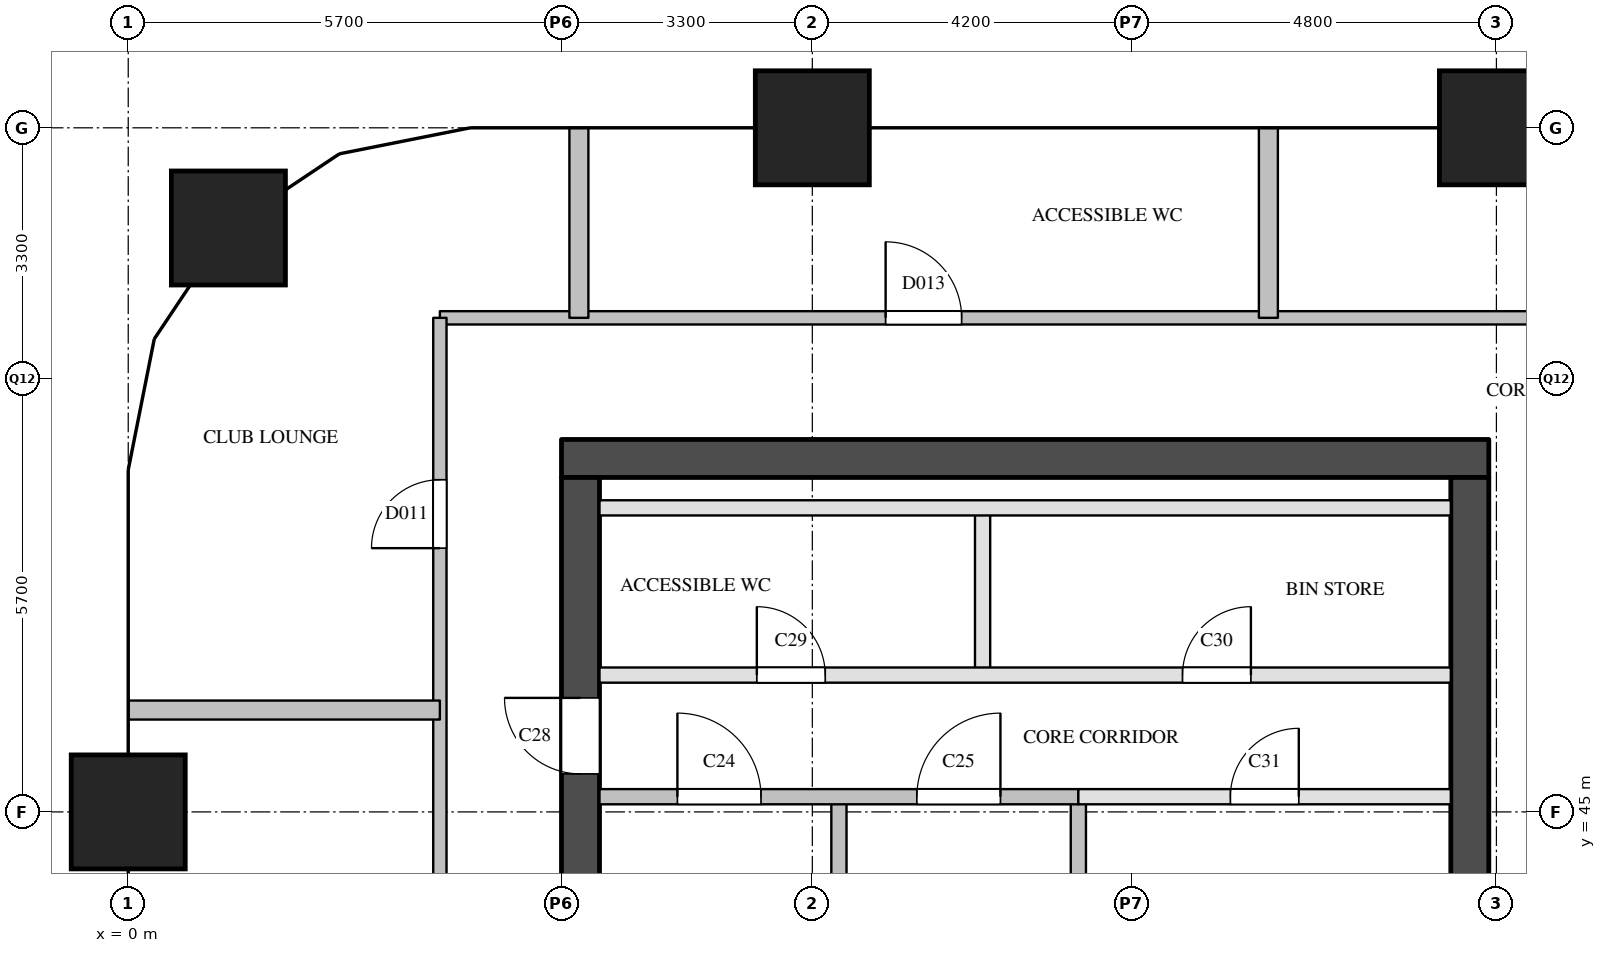
"""IFC4 building model, lengths in metres.
Left out: names, types, materials, properties, quantities, classifications, styles, units other than length and angle.
Written with IfcOpenShell. Run it as: python <this file> out.ifc"""

import sys

from ifc_helpers import new_model, si_unit, direction, frame, frame_2d, origin, origin_2d, place, context, subcontext, project, spatial, rectangle, extrude, element, fill, save


model = new_model("IFC4")
c1 = context("Model", 3, precision=1e-05, world=origin(), true_north=direction((0.0, 1.0)))
c2 = subcontext(c1, "Body", "Model", "MODEL_VIEW")
j1 = project(units=[si_unit("LENGTHUNIT", "METRE"), si_unit("PLANEANGLEUNIT", "RADIAN")], contexts=[c1])
p1 = place(None, origin())
s1 = spatial("IfcSite", under=j1, at=p1, CompositionType="ELEMENT")
p2 = place(p1, origin())
s2 = spatial("IfcBuilding", under=s1, at=p2, CompositionType="ELEMENT")
p3 = place(p2, frame((0.0, 0.0, 177.8)))
s3 = spatial("IfcBuildingStorey", under=s2, at=p3, CompositionType="ELEMENT", Elevation=177.8)
for number, where, z_axis, x_axis in (
    (1, (0.0, 45.0, 0.0), (0.0, 0.0, 1.0), (1.0, 0.0, 0.0)),
    (2, (1.318, 52.682, 0.0), (0.0, 0.0, 1.0), (1.0, 0.0, 0.0)),
    (3, (9.0, 54.0, 0.0), (0.0, 0.0, 1.0), (1.0, 0.0, 0.0)),
    (4, (18.0, 54.0, 0.0), (0.0, 0.0, 1.0), (1.0, 0.0, 0.0)),
):
    element("IfcColumn", number, at=place(p3, frame(where, z_axis=z_axis, x_axis=x_axis)), inside=s3, PredefinedType="COLUMN", context=c2, shape_type="SweptSolid", body=[
        extrude(rectangle(XDim=1.5, YDim=1.5, at=origin_2d()), origin(), (0.0, 0.0, 1.0), 3.9),
    ])
p4 = place(p3, frame((5.7, 49.65, 0.0), z_axis=(0.0, 0.0, 1.0), x_axis=(1.0, 0.0, 0.0)))
e5 = element("IfcWall", 5, at=p4, inside=s3, PredefinedType="SHEAR", context=c2, shape_type="SweptSolid", body=[
    extrude(rectangle(XDim=12.2, YDim=0.5, at=frame_2d((6.1, 0.0))), origin(), (0.0, 0.0, 1.0), 3.6),
])
p5 = place(p3, frame((5.95, 29.1, 0.0), z_axis=(0.0, 0.0, 1.0), x_axis=(0.0, 1.0, 0.0)))
e6 = element("IfcWall", 6, at=p5, inside=s3, PredefinedType="SHEAR", context=c2, shape_type="SweptSolid", body=[
    extrude(rectangle(XDim=20.3, YDim=0.5, at=frame_2d((10.15, 0.0))), origin(), (0.0, 0.0, 1.0), 3.6),
])
p6 = place(p5, frame((3.45, 0.0, 0.0)))
e7 = element("IfcOpeningElement", 7, at=p6, cuts=e6, PredefinedType="OPENING", context=c2, shape_type="SweptSolid", body=[
    extrude(rectangle(XDim=1.0, YDim=2.1, at=frame_2d((0.5, 1.05))), frame((0.0, 0.26, 0.0), z_axis=(0.0, -1.0, 0.0), x_axis=(1.0, 0.0, 0.0)), (0.0, 0.0, 1.0), 0.52),
])
p7 = place(p5, frame((16.4, 0.0, 0.0)))
e8 = element("IfcOpeningElement", 8, at=p7, cuts=e6, PredefinedType="OPENING", context=c2, shape_type="SweptSolid", body=[
    extrude(rectangle(XDim=1.0, YDim=2.1, at=frame_2d((0.5, 1.05))), frame((0.0, 0.26, 0.0), z_axis=(0.0, -1.0, 0.0), x_axis=(1.0, 0.0, 0.0)), (0.0, 0.0, 1.0), 0.52),
])
p8 = place(p3, frame((17.65, 29.1, 0.0), z_axis=(0.0, 0.0, 1.0), x_axis=(0.0, 1.0, 0.0)))
e9 = element("IfcWall", 9, at=p8, inside=s3, PredefinedType="SHEAR", context=c2, shape_type="SweptSolid", body=[
    extrude(rectangle(XDim=20.3, YDim=0.5, at=frame_2d((10.15, 0.0))), origin(), (0.0, 0.0, 1.0), 3.6),
])
p9 = place(p8, frame((1.25, 0.0, 0.0)))
e10 = element("IfcOpeningElement", 10, at=p9, cuts=e9, PredefinedType="OPENING", context=c2, shape_type="SweptSolid", body=[
    extrude(rectangle(XDim=0.7, YDim=2.1, at=frame_2d((0.35, 1.05))), frame((0.0, 0.26, 0.0), z_axis=(0.0, -1.0, 0.0), x_axis=(1.0, 0.0, 0.0)), (0.0, 0.0, 1.0), 0.52),
])
p10 = place(p8, frame((7.05, 0.0, 0.0)))
e11 = element("IfcOpeningElement", 11, at=p10, cuts=e9, PredefinedType="OPENING", context=c2, shape_type="SweptSolid", body=[
    extrude(rectangle(XDim=0.7, YDim=2.1, at=frame_2d((0.35, 1.05))), frame((0.0, 0.26, 0.0), z_axis=(0.0, -1.0, 0.0), x_axis=(1.0, 0.0, 0.0)), (0.0, 0.0, 1.0), 0.52),
])
p11 = place(p8, frame((3.6, 0.0, 0.0)))
e12 = element("IfcOpeningElement", 12, at=p11, cuts=e9, PredefinedType="OPENING", context=c2, shape_type="SweptSolid", body=[
    extrude(rectangle(XDim=1.8, YDim=2.1, at=frame_2d((0.9, 1.05))), frame((0.0, 0.26, 0.0), z_axis=(0.0, -1.0, 0.0), x_axis=(1.0, 0.0, 0.0)), (0.0, 0.0, 1.0), 0.52),
])
p12 = place(p3, frame((9.35, 40.9, 0.0), z_axis=(0.0, 0.0, 1.0), x_axis=(0.0, 1.0, 0.0)))
e13 = element("IfcWall", 13, at=p12, inside=s3, PredefinedType="SOLIDWALL", context=c2, shape_type="SweptSolid", body=[
    extrude(rectangle(XDim=4.3, YDim=0.2, at=frame_2d((2.15, 0.0))), origin(), (0.0, 0.0, 1.0), 3.6),
])
p13 = place(p3, frame((11.24, 46.8, 0.0), z_axis=(0.0, 0.0, 1.0), x_axis=(0.0, 1.0, 0.0)))
e14 = element("IfcWall", 14, at=p13, inside=s3, PredefinedType="PARTITIONING", context=c2, shape_type="SweptSolid", body=[
    extrude(rectangle(XDim=2.2, YDim=0.2, at=frame_2d((1.1, 0.0))), origin(), (0.0, 0.0, 1.0), 3.6),
])
p14 = place(p3, frame((12.5, 40.9, 0.0), z_axis=(0.0, 0.0, 1.0), x_axis=(0.0, 1.0, 0.0)))
e15 = element("IfcWall", 15, at=p14, inside=s3, PredefinedType="SOLIDWALL", context=c2, shape_type="SweptSolid", body=[
    extrude(rectangle(XDim=4.3, YDim=0.2, at=frame_2d((2.15, 0.0))), origin(), (0.0, 0.0, 1.0), 3.6),
])
p15 = place(p3, frame((12.5, 45.2, 0.0), z_axis=(0.0, 0.0, 1.0), x_axis=(1.0, 0.0, 0.0)))
e16 = element("IfcWall", 16, at=p15, inside=s3, PredefinedType="PARTITIONING", context=c2, shape_type="SweptSolid", body=[
    extrude(rectangle(XDim=4.9, YDim=0.2, at=frame_2d((2.45, 0.0))), origin(), (0.0, 0.0, 1.0), 3.6),
])
p16 = place(p15, frame((2.0, 0.0, 0.0)))
e17 = element("IfcOpeningElement", 17, at=p16, cuts=e16, PredefinedType="OPENING", context=c2, shape_type="SweptSolid", body=[
    extrude(rectangle(XDim=0.9, YDim=2.1, at=frame_2d((0.45, 1.05))), frame((0.0, 0.11, 0.0), z_axis=(0.0, -1.0, 0.0), x_axis=(1.0, 0.0, 0.0)), (0.0, 0.0, 1.0), 0.22),
])
p17 = place(p3, frame((6.2, 45.2, 0.0), z_axis=(0.0, 0.0, 1.0), x_axis=(1.0, 0.0, 0.0)))
e18 = element("IfcWall", 18, at=p17, inside=s3, PredefinedType="SOLIDWALL", context=c2, shape_type="SweptSolid", body=[
    extrude(rectangle(XDim=6.3, YDim=0.2, at=frame_2d((3.15, 0.0))), origin(), (0.0, 0.0, 1.0), 3.6),
])
p18 = place(p17, frame((1.025, 0.0, 0.0)))
e19 = element("IfcOpeningElement", 19, at=p18, cuts=e18, PredefinedType="OPENING", context=c2, shape_type="SweptSolid", body=[
    extrude(rectangle(XDim=1.1, YDim=2.1, at=frame_2d((0.55, 1.05))), frame((0.0, 0.11, 0.0), z_axis=(0.0, -1.0, 0.0), x_axis=(1.0, 0.0, 0.0)), (0.0, 0.0, 1.0), 0.22),
])
p19 = place(p17, frame((4.175, 0.0, 0.0)))
e20 = element("IfcOpeningElement", 20, at=p19, cuts=e18, PredefinedType="OPENING", context=c2, shape_type="SweptSolid", body=[
    extrude(rectangle(XDim=1.1, YDim=2.1, at=frame_2d((0.55, 1.05))), frame((0.0, 0.11, 0.0), z_axis=(0.0, -1.0, 0.0), x_axis=(1.0, 0.0, 0.0)), (0.0, 0.0, 1.0), 0.22),
])
p20 = place(p3, frame((6.2, 46.8, 0.0), z_axis=(0.0, 0.0, 1.0), x_axis=(1.0, 0.0, 0.0)))
e21 = element("IfcWall", 21, at=p20, inside=s3, PredefinedType="PARTITIONING", context=c2, shape_type="SweptSolid", body=[
    extrude(rectangle(XDim=11.2, YDim=0.2, at=frame_2d((5.6, 0.0))), origin(), (0.0, 0.0, 1.0), 3.6),
])
p21 = place(p20, frame((2.07, 0.0, 0.0)))
e22 = element("IfcOpeningElement", 22, at=p21, cuts=e21, PredefinedType="OPENING", context=c2, shape_type="SweptSolid", body=[
    extrude(rectangle(XDim=0.9, YDim=2.1, at=frame_2d((0.45, 1.05))), frame((0.0, 0.11, 0.0), z_axis=(0.0, -1.0, 0.0), x_axis=(1.0, 0.0, 0.0)), (0.0, 0.0, 1.0), 0.22),
])
p22 = place(p20, frame((7.67, 0.0, 0.0)))
e23 = element("IfcOpeningElement", 23, at=p22, cuts=e21, PredefinedType="OPENING", context=c2, shape_type="SweptSolid", body=[
    extrude(rectangle(XDim=0.9, YDim=2.1, at=frame_2d((0.45, 1.05))), frame((0.0, 0.11, 0.0), z_axis=(0.0, -1.0, 0.0), x_axis=(1.0, 0.0, 0.0)), (0.0, 0.0, 1.0), 0.22),
])
p23 = place(p3, frame((6.2, 49.0, 0.0), z_axis=(0.0, 0.0, 1.0), x_axis=(1.0, 0.0, 0.0)))
e24 = element("IfcWall", 24, at=p23, inside=s3, PredefinedType="PARTITIONING", context=c2, shape_type="SweptSolid", body=[
    extrude(rectangle(XDim=11.2, YDim=0.2, at=frame_2d((5.6, 0.0))), origin(), (0.0, 0.0, 1.0), 3.6),
])
p24 = place(p3, frame((4.1, 51.5, 0.0), z_axis=(0.0, 0.0, 1.0), x_axis=(1.0, 0.0, 0.0)))
e25 = element("IfcWall", 25, at=p24, inside=s3, PredefinedType="PARTITIONING", context=c2, shape_type="SweptSolid", body=[
    extrude(rectangle(XDim=15.4, YDim=0.175, at=frame_2d((7.7, 0.0))), origin(), (0.0, 0.0, 1.0), 3.6),
])
p25 = place(p24, frame((5.864, 0.0, 0.0)))
e26 = element("IfcOpeningElement", 26, at=p25, cuts=e25, PredefinedType="OPENING", context=c2, shape_type="SweptSolid", body=[
    extrude(rectangle(XDim=1.0, YDim=2.1, at=frame_2d((0.5, 1.05))), frame((0.0, 0.097, 0.0), z_axis=(0.0, -1.0, 0.0), x_axis=(1.0, 0.0, 0.0)), (0.0, 0.0, 1.0), 0.195),
])
p26 = place(p3, frame((4.1, 28.5, 0.0), z_axis=(0.0, 0.0, 1.0), x_axis=(0.0, 1.0, 0.0)))
e27 = element("IfcWall", 27, at=p26, inside=s3, PredefinedType="PARTITIONING", context=c2, shape_type="SweptSolid", body=[
    extrude(rectangle(XDim=23.0, YDim=0.175, at=frame_2d((11.5, 0.0))), origin(), (0.0, 0.0, 1.0), 3.6),
])
p27 = place(p26, frame((2.8, 0.0, 0.0)))
e28 = element("IfcOpeningElement", 28, at=p27, cuts=e27, PredefinedType="OPENING", context=c2, shape_type="SweptSolid", body=[
    extrude(rectangle(XDim=0.9, YDim=2.1, at=frame_2d((0.45, 1.05))), frame((0.0, 0.097, 0.0), z_axis=(0.0, -1.0, 0.0), x_axis=(1.0, 0.0, 0.0)), (0.0, 0.0, 1.0), 0.195),
])
p28 = place(p26, frame((11.72, 0.0, 0.0)))
e29 = element("IfcOpeningElement", 29, at=p28, cuts=e27, PredefinedType="OPENING", context=c2, shape_type="SweptSolid", body=[
    extrude(rectangle(XDim=0.9, YDim=2.1, at=frame_2d((0.45, 1.05))), frame((0.0, 0.097, 0.0), z_axis=(0.0, -1.0, 0.0), x_axis=(1.0, 0.0, 0.0)), (0.0, 0.0, 1.0), 0.195),
])
p29 = place(p26, frame((19.97, 0.0, 0.0)))
e30 = element("IfcOpeningElement", 30, at=p29, cuts=e27, PredefinedType="OPENING", context=c2, shape_type="SweptSolid", body=[
    extrude(rectangle(XDim=0.9, YDim=2.1, at=frame_2d((0.45, 1.05))), frame((0.0, 0.097, 0.0), z_axis=(0.0, -1.0, 0.0), x_axis=(1.0, 0.0, 0.0)), (0.0, 0.0, 1.0), 0.195),
])
p30 = place(p3, frame((0.0, 46.34, 0.0), z_axis=(0.0, 0.0, 1.0), x_axis=(1.0, 0.0, 0.0)))
e31 = element("IfcWall", 31, at=p30, inside=s3, PredefinedType="PARTITIONING", context=c2, shape_type="SweptSolid", body=[
    extrude(rectangle(XDim=4.1, YDim=0.25, at=frame_2d((2.05, 0.0))), origin(), (0.0, 0.0, 1.0), 2.6),
])
for number, where, z_axis, x_axis in (
    (32, (5.929, 51.5, 0.0), (0.0, 0.0, 1.0), (0.0, 1.0, 0.0)),
    (33, (15.0, 51.5, 0.0), (0.0, 0.0, 1.0), (0.0, 1.0, 0.0)),
):
    element("IfcWall", number, at=place(p3, frame(where, z_axis=z_axis, x_axis=x_axis)), inside=s3, PredefinedType="PARTITIONING", context=c2, shape_type="SweptSolid", body=[
        extrude(rectangle(XDim=2.5, YDim=0.25, at=frame_2d((1.25, 0.0))), origin(), (0.0, 0.0, 1.0), 2.6),
    ])
p31 = place(p18, origin())
e34 = element("IfcDoor", 34, at=p31, inside=s3, OperationType="SINGLE_SWING_LEFT", PredefinedType="DOOR", context=c2, shape_type="SweptSolid", body=[
    extrude(rectangle(XDim=1.1, YDim=2.1, at=frame_2d((0.55, 1.05))), frame((0.0, 0.025, 0.0), z_axis=(0.0, -1.0, 0.0), x_axis=(1.0, 0.0, 0.0)), (0.0, 0.0, 1.0), 0.05),
])
fill(e19, e34)
p32 = place(p19, origin())
e35 = element("IfcDoor", 35, at=p32, inside=s3, OperationType="SINGLE_SWING_RIGHT", PredefinedType="DOOR", context=c2, shape_type="SweptSolid", body=[
    extrude(rectangle(XDim=1.1, YDim=2.1, at=frame_2d((0.55, 1.05))), frame((0.0, 0.025, 0.0), z_axis=(0.0, -1.0, 0.0), x_axis=(1.0, 0.0, 0.0)), (0.0, 0.0, 1.0), 0.05),
])
fill(e20, e35)
p33 = place(p7, origin())
e36 = element("IfcDoor", 36, at=p33, inside=s3, OperationType="SINGLE_SWING_RIGHT", PredefinedType="DOOR", context=c2, shape_type="SweptSolid", body=[
    extrude(rectangle(XDim=1.0, YDim=2.1, at=frame_2d((0.5, 1.05))), frame((0.0, 0.025, 0.0), z_axis=(0.0, -1.0, 0.0), x_axis=(1.0, 0.0, 0.0)), (0.0, 0.0, 1.0), 0.05),
])
fill(e8, e36)
p34 = place(p21, origin())
e37 = element("IfcDoor", 37, at=p34, inside=s3, OperationType="SINGLE_SWING_LEFT", PredefinedType="DOOR", context=c2, shape_type="SweptSolid", body=[
    extrude(rectangle(XDim=0.9, YDim=2.1, at=frame_2d((0.45, 1.05))), frame((0.0, 0.025, 0.0), z_axis=(0.0, -1.0, 0.0), x_axis=(1.0, 0.0, 0.0)), (0.0, 0.0, 1.0), 0.05),
])
fill(e22, e37)
p35 = place(p22, origin())
e38 = element("IfcDoor", 38, at=p35, inside=s3, OperationType="SINGLE_SWING_RIGHT", PredefinedType="DOOR", context=c2, shape_type="SweptSolid", body=[
    extrude(rectangle(XDim=0.9, YDim=2.1, at=frame_2d((0.45, 1.05))), frame((0.0, 0.025, 0.0), z_axis=(0.0, -1.0, 0.0), x_axis=(1.0, 0.0, 0.0)), (0.0, 0.0, 1.0), 0.05),
])
fill(e23, e38)
p36 = place(p16, origin())
e39 = element("IfcDoor", 39, at=p36, inside=s3, OperationType="SINGLE_SWING_RIGHT", PredefinedType="DOOR", context=c2, shape_type="SweptSolid", body=[
    extrude(rectangle(XDim=0.9, YDim=2.1, at=frame_2d((0.45, 1.05))), frame((0.0, 0.025, 0.0), z_axis=(0.0, -1.0, 0.0), x_axis=(1.0, 0.0, 0.0)), (0.0, 0.0, 1.0), 0.05),
])
fill(e17, e39)
p37 = place(p29, origin())
e40 = element("IfcDoor", 40, at=p37, inside=s3, OperationType="SINGLE_SWING_LEFT", PredefinedType="DOOR", context=c2, shape_type="SweptSolid", body=[
    extrude(rectangle(XDim=0.9, YDim=2.1, at=frame_2d((0.45, 1.05))), frame((0.0, 0.025, 0.0), z_axis=(0.0, -1.0, 0.0), x_axis=(1.0, 0.0, 0.0)), (0.0, 0.0, 1.0), 0.05),
])
fill(e30, e40)
p38 = place(p25, origin())
e41 = element("IfcDoor", 41, at=p38, inside=s3, OperationType="SINGLE_SWING_LEFT", PredefinedType="DOOR", context=c2, shape_type="SweptSolid", body=[
    extrude(rectangle(XDim=1.0, YDim=2.1, at=frame_2d((0.5, 1.05))), frame((0.0, 0.025, 0.0), z_axis=(0.0, -1.0, 0.0), x_axis=(1.0, 0.0, 0.0)), (0.0, 0.0, 1.0), 0.05),
])
fill(e26, e41)
save(model, sys.argv[1])
